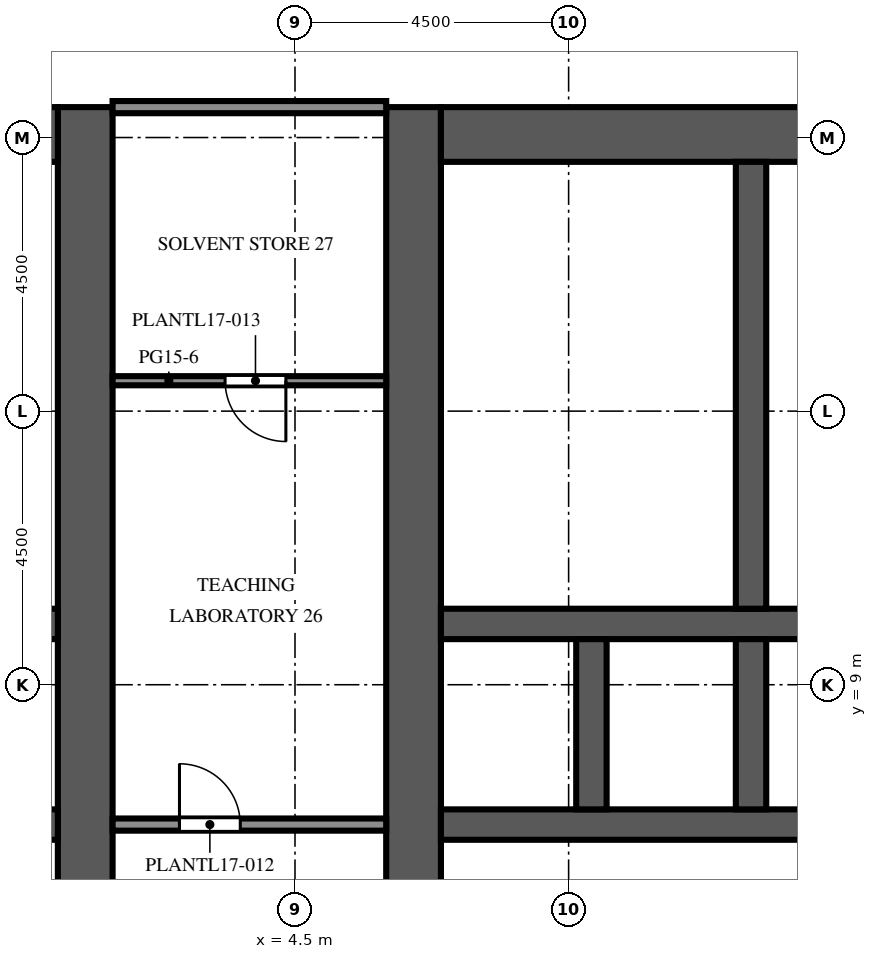
"""IFC4 building model, lengths in metres.
Left out: names, types, materials, properties, quantities, classifications, styles, units other than length and angle.
Written with IfcOpenShell. Run it as: python <this file> out.ifc"""

import sys

from ifc_helpers import new_model, si_unit, direction, frame, frame_2d, origin, place, context, subcontext, project, spatial, rectangle, extrude, element, fill, save


model = new_model("IFC4")
c1 = context("Model", 3, precision=1e-05, world=origin(), true_north=direction((0.0, 1.0)))
c2 = subcontext(c1, "Body", "Model", "MODEL_VIEW")
j1 = project(units=[si_unit("LENGTHUNIT", "METRE"), si_unit("PLANEANGLEUNIT", "RADIAN")], contexts=[c1])
p1 = place(None, origin())
s1 = spatial("IfcSite", under=j1, at=p1, CompositionType="ELEMENT")
p2 = place(p1, origin())
s2 = spatial("IfcBuilding", under=s1, at=p2, CompositionType="ELEMENT")
p3 = place(p2, frame((0.0, 0.0, 76.6)))
s3 = spatial("IfcBuildingStorey", under=s2, at=p3, CompositionType="ELEMENT", Elevation=76.6)
p4 = place(p3, frame((1.05, -9.0, 0.0), z_axis=(0.0, 0.0, 1.0), x_axis=(0.0, 1.0, 0.0)))
e1 = element("IfcWall", 1, at=p4, inside=s3, PredefinedType="SHEAR", context=c2, shape_type="SweptSolid", body=[
    extrude(rectangle(XDim=27.5, YDim=0.9, at=frame_2d((13.75, 0.0))), origin(), (0.0, 0.0, 1.0), 5.4),
])
p5 = place(p4, frame((12.55, 0.0, 0.0)))
e2 = element("IfcOpeningElement", 2, at=p5, cuts=e1, PredefinedType="OPENING", context=c2, shape_type="SweptSolid", body=[
    extrude(rectangle(XDim=2.4, YDim=2.4, at=frame_2d((1.2, 1.2))), frame((0.0, 0.46, 0.0), z_axis=(0.0, -1.0, 0.0), x_axis=(1.0, 0.0, 0.0)), (0.0, 0.0, 1.0), 0.92),
])
p6 = place(p4, frame((5.445, 0.0, 0.0)))
e3 = element("IfcOpeningElement", 3, at=p6, cuts=e1, PredefinedType="OPENING", context=c2, shape_type="SweptSolid", body=[
    extrude(rectangle(XDim=1.2, YDim=2.1, at=frame_2d((0.6, 1.05))), frame((0.0, 0.46, 0.0), z_axis=(0.0, -1.0, 0.0), x_axis=(1.0, 0.0, 0.0)), (0.0, 0.0, 1.0), 0.92),
])
p7 = place(p4, frame((19.485, 0.0, 0.0)))
e4 = element("IfcOpeningElement", 4, at=p7, cuts=e1, PredefinedType="OPENING", context=c2, shape_type="SweptSolid", body=[
    extrude(rectangle(XDim=1.0, YDim=2.1, at=frame_2d((0.5, 1.05))), frame((0.0, 0.46, 0.0), z_axis=(0.0, -1.0, 0.0), x_axis=(1.0, 0.0, 0.0)), (0.0, 0.0, 1.0), 0.92),
])
p8 = place(p4, frame((21.139, 0.0, 0.0)))
e5 = element("IfcOpeningElement", 5, at=p8, cuts=e1, PredefinedType="OPENING", context=c2, shape_type="SweptSolid", body=[
    extrude(rectangle(XDim=1.0, YDim=2.1, at=frame_2d((0.5, 1.05))), frame((0.0, 0.46, 0.0), z_axis=(0.0, -1.0, 0.0), x_axis=(1.0, 0.0, 0.0)), (0.0, 0.0, 1.0), 0.92),
])
p9 = place(p4, frame((23.16, 0.0, 0.0)))
e6 = element("IfcOpeningElement", 6, at=p9, cuts=e1, PredefinedType="OPENING", context=c2, shape_type="SweptSolid", body=[
    extrude(rectangle(XDim=1.0, YDim=2.1, at=frame_2d((0.5, 1.05))), frame((0.0, 0.46, 0.0), z_axis=(0.0, -1.0, 0.0), x_axis=(1.0, 0.0, 0.0)), (0.0, 0.0, 1.0), 0.92),
])
p10 = place(p4, frame((25.181, 0.0, 0.0)))
e7 = element("IfcOpeningElement", 7, at=p10, cuts=e1, PredefinedType="OPENING", context=c2, shape_type="SweptSolid", body=[
    extrude(rectangle(XDim=1.0, YDim=2.1, at=frame_2d((0.5, 1.05))), frame((0.0, 0.46, 0.0), z_axis=(0.0, -1.0, 0.0), x_axis=(1.0, 0.0, 0.0)), (0.0, 0.0, 1.0), 0.92),
])
p11 = place(p3, frame((-9.6, 18.05, 0.0), z_axis=(0.0, 0.0, 1.0), x_axis=(1.0, 0.0, 0.0)))
e8 = element("IfcWall", 8, at=p11, inside=s3, PredefinedType="SHEAR", context=c2, shape_type="SweptSolid", body=[
    extrude(rectangle(XDim=10.2, YDim=0.9, at=frame_2d((5.1, 0.0))), origin(), (0.0, 0.0, 1.0), 5.4),
])
p12 = place(p3, frame((-9.6, 6.7, 0.0), z_axis=(0.0, 0.0, 1.0), x_axis=(1.0, 0.0, 0.0)))
e9 = element("IfcWall", 9, at=p12, inside=s3, PredefinedType="SHEAR", context=c2, shape_type="SweptSolid", body=[
    extrude(rectangle(XDim=10.2, YDim=0.5, at=frame_2d((5.1, 0.0))), origin(), (0.0, 0.0, 1.0), 5.4),
])
p13 = place(p12, frame((0.562, 0.0, 0.0)))
e10 = element("IfcOpeningElement", 10, at=p13, cuts=e9, PredefinedType="OPENING", context=c2, shape_type="SweptSolid", body=[
    extrude(rectangle(XDim=1.1, YDim=2.1, at=frame_2d((0.55, 1.05))), frame((0.0, 0.26, 0.0), z_axis=(0.0, -1.0, 0.0), x_axis=(1.0, 0.0, 0.0)), (0.0, 0.0, 1.0), 0.52),
])
p14 = place(p12, frame((3.288, 0.0, 0.0)))
e11 = element("IfcOpeningElement", 11, at=p14, cuts=e9, PredefinedType="OPENING", context=c2, shape_type="SweptSolid", body=[
    extrude(rectangle(XDim=1.0, YDim=2.1, at=frame_2d((0.5, 1.05))), frame((0.0, 0.26, 0.0), z_axis=(0.0, -1.0, 0.0), x_axis=(1.0, 0.0, 0.0)), (0.0, 0.0, 1.0), 0.52),
])
p15 = place(p12, frame((5.913, 0.0, 0.0)))
e12 = element("IfcOpeningElement", 12, at=p15, cuts=e9, PredefinedType="OPENING", context=c2, shape_type="SweptSolid", body=[
    extrude(rectangle(XDim=1.0, YDim=2.1, at=frame_2d((0.5, 1.05))), frame((0.0, 0.26, 0.0), z_axis=(0.0, -1.0, 0.0), x_axis=(1.0, 0.0, 0.0)), (0.0, 0.0, 1.0), 0.52),
])
p16 = place(p12, frame((8.587, 0.0, 0.0)))
e13 = element("IfcOpeningElement", 13, at=p16, cuts=e9, PredefinedType="OPENING", context=c2, shape_type="SweptSolid", body=[
    extrude(rectangle(XDim=1.0, YDim=2.1, at=frame_2d((0.5, 1.05))), frame((0.0, 0.26, 0.0), z_axis=(0.0, -1.0, 0.0), x_axis=(1.0, 0.0, 0.0)), (0.0, 0.0, 1.0), 0.52),
])
p17 = place(p3, frame((-9.6, 10.0, 0.0), z_axis=(0.0, 0.0, 1.0), x_axis=(1.0, 0.0, 0.0)))
e14 = element("IfcWall", 14, at=p17, inside=s3, PredefinedType="SHEAR", context=c2, shape_type="SweptSolid", body=[
    extrude(rectangle(XDim=10.2, YDim=0.5, at=frame_2d((5.1, 0.0))), origin(), (0.0, 0.0, 1.0), 5.4),
])
p18 = place(p3, frame((6.45, -9.0, 0.0), z_axis=(0.0, 0.0, 1.0), x_axis=(0.0, 1.0, 0.0)))
e15 = element("IfcWall", 15, at=p18, inside=s3, PredefinedType="SHEAR", context=c2, shape_type="SweptSolid", body=[
    extrude(rectangle(XDim=27.5, YDim=0.9, at=frame_2d((13.75, 0.0))), origin(), (0.0, 0.0, 1.0), 5.4),
])
p19 = place(p18, frame((12.55, 0.0, 0.0)))
e16 = element("IfcOpeningElement", 16, at=p19, cuts=e15, PredefinedType="OPENING", context=c2, shape_type="SweptSolid", body=[
    extrude(rectangle(XDim=2.4, YDim=2.4, at=frame_2d((1.2, 1.2))), frame((0.0, 0.46, 0.0), z_axis=(0.0, -1.0, 0.0), x_axis=(1.0, 0.0, 0.0)), (0.0, 0.0, 1.0), 0.92),
])
p20 = place(p18, frame((5.445, 0.0, 0.0)))
e17 = element("IfcOpeningElement", 17, at=p20, cuts=e15, PredefinedType="OPENING", context=c2, shape_type="SweptSolid", body=[
    extrude(rectangle(XDim=1.2, YDim=2.1, at=frame_2d((0.6, 1.05))), frame((0.0, 0.46, 0.0), z_axis=(0.0, -1.0, 0.0), x_axis=(1.0, 0.0, 0.0)), (0.0, 0.0, 1.0), 0.92),
])
p21 = place(p18, frame((19.485, 0.0, 0.0)))
e18 = element("IfcOpeningElement", 18, at=p21, cuts=e15, PredefinedType="OPENING", context=c2, shape_type="SweptSolid", body=[
    extrude(rectangle(XDim=1.0, YDim=2.1, at=frame_2d((0.5, 1.05))), frame((0.0, 0.46, 0.0), z_axis=(0.0, -1.0, 0.0), x_axis=(1.0, 0.0, 0.0)), (0.0, 0.0, 1.0), 0.92),
])
p22 = place(p18, frame((21.139, 0.0, 0.0)))
e19 = element("IfcOpeningElement", 19, at=p22, cuts=e15, PredefinedType="OPENING", context=c2, shape_type="SweptSolid", body=[
    extrude(rectangle(XDim=1.0, YDim=2.1, at=frame_2d((0.5, 1.05))), frame((0.0, 0.46, 0.0), z_axis=(0.0, -1.0, 0.0), x_axis=(1.0, 0.0, 0.0)), (0.0, 0.0, 1.0), 0.92),
])
p23 = place(p18, frame((23.16, 0.0, 0.0)))
e20 = element("IfcOpeningElement", 20, at=p23, cuts=e15, PredefinedType="OPENING", context=c2, shape_type="SweptSolid", body=[
    extrude(rectangle(XDim=1.0, YDim=2.1, at=frame_2d((0.5, 1.05))), frame((0.0, 0.46, 0.0), z_axis=(0.0, -1.0, 0.0), x_axis=(1.0, 0.0, 0.0)), (0.0, 0.0, 1.0), 0.92),
])
p24 = place(p18, frame((25.181, 0.0, 0.0)))
e21 = element("IfcOpeningElement", 21, at=p24, cuts=e15, PredefinedType="OPENING", context=c2, shape_type="SweptSolid", body=[
    extrude(rectangle(XDim=1.0, YDim=2.1, at=frame_2d((0.5, 1.05))), frame((0.0, 0.46, 0.0), z_axis=(0.0, -1.0, 0.0), x_axis=(1.0, 0.0, 0.0)), (0.0, 0.0, 1.0), 0.92),
])
p25 = place(p3, frame((6.9, 18.05, 0.0), z_axis=(0.0, 0.0, 1.0), x_axis=(1.0, 0.0, 0.0)))
e22 = element("IfcWall", 22, at=p25, inside=s3, PredefinedType="SHEAR", context=c2, shape_type="SweptSolid", body=[
    extrude(rectangle(XDim=10.2, YDim=0.9, at=frame_2d((5.1, 0.0))), origin(), (0.0, 0.0, 1.0), 5.4),
])
p26 = place(p3, frame((6.9, 6.7, 0.0), z_axis=(0.0, 0.0, 1.0), x_axis=(1.0, 0.0, 0.0)))
e23 = element("IfcWall", 23, at=p26, inside=s3, PredefinedType="SHEAR", context=c2, shape_type="SweptSolid", body=[
    extrude(rectangle(XDim=10.2, YDim=0.5, at=frame_2d((5.1, 0.0))), origin(), (0.0, 0.0, 1.0), 5.4),
])
p27 = place(p26, frame((0.562, 0.0, 0.0)))
e24 = element("IfcOpeningElement", 24, at=p27, cuts=e23, PredefinedType="OPENING", context=c2, shape_type="SweptSolid", body=[
    extrude(rectangle(XDim=1.1, YDim=2.1, at=frame_2d((0.55, 1.05))), frame((0.0, 0.26, 0.0), z_axis=(0.0, -1.0, 0.0), x_axis=(1.0, 0.0, 0.0)), (0.0, 0.0, 1.0), 0.52),
])
p28 = place(p26, frame((3.288, 0.0, 0.0)))
e25 = element("IfcOpeningElement", 25, at=p28, cuts=e23, PredefinedType="OPENING", context=c2, shape_type="SweptSolid", body=[
    extrude(rectangle(XDim=1.0, YDim=2.1, at=frame_2d((0.5, 1.05))), frame((0.0, 0.26, 0.0), z_axis=(0.0, -1.0, 0.0), x_axis=(1.0, 0.0, 0.0)), (0.0, 0.0, 1.0), 0.52),
])
p29 = place(p26, frame((5.913, 0.0, 0.0)))
e26 = element("IfcOpeningElement", 26, at=p29, cuts=e23, PredefinedType="OPENING", context=c2, shape_type="SweptSolid", body=[
    extrude(rectangle(XDim=1.0, YDim=2.1, at=frame_2d((0.5, 1.05))), frame((0.0, 0.26, 0.0), z_axis=(0.0, -1.0, 0.0), x_axis=(1.0, 0.0, 0.0)), (0.0, 0.0, 1.0), 0.52),
])
p30 = place(p26, frame((8.587, 0.0, 0.0)))
e27 = element("IfcOpeningElement", 27, at=p30, cuts=e23, PredefinedType="OPENING", context=c2, shape_type="SweptSolid", body=[
    extrude(rectangle(XDim=1.0, YDim=2.1, at=frame_2d((0.5, 1.05))), frame((0.0, 0.26, 0.0), z_axis=(0.0, -1.0, 0.0), x_axis=(1.0, 0.0, 0.0)), (0.0, 0.0, 1.0), 0.52),
])
p31 = place(p3, frame((6.9, 10.0, 0.0), z_axis=(0.0, 0.0, 1.0), x_axis=(1.0, 0.0, 0.0)))
e28 = element("IfcWall", 28, at=p31, inside=s3, PredefinedType="SHEAR", context=c2, shape_type="SweptSolid", body=[
    extrude(rectangle(XDim=10.2, YDim=0.5, at=frame_2d((5.1, 0.0))), origin(), (0.0, 0.0, 1.0), 5.4),
])
for number, where, z_axis, x_axis in (
    (29, (9.375, 6.95, 0.0), (0.0, 0.0, 1.0), (0.0, 1.0, 0.0)),
    (30, (12.0, 6.95, 0.0), (0.0, 0.0, 1.0), (0.0, 1.0, 0.0)),
):
    element("IfcWall", number, at=place(p3, frame(where, z_axis=z_axis, x_axis=x_axis)), inside=s3, PredefinedType="SHEAR", context=c2, shape_type="SweptSolid", body=[
        extrude(rectangle(XDim=2.8, YDim=0.5, at=frame_2d((1.4, 0.0))), origin(), (0.0, 0.0, 1.0), 5.4),
    ])
p32 = place(p3, frame((12.0, 10.25, 0.0), z_axis=(0.0, 0.0, 1.0), x_axis=(0.0, 1.0, 0.0)))
e31 = element("IfcWall", 31, at=p32, inside=s3, PredefinedType="SHEAR", context=c2, shape_type="SweptSolid", body=[
    extrude(rectangle(XDim=7.35, YDim=0.5, at=frame_2d((3.675, 0.0))), origin(), (0.0, 0.0, 1.0), 5.4),
])
for number, where, z_axis, x_axis in (
    (32, (-4.25, 11.72, 0.0), (0.0, 0.0, 1.0), (1.0, 0.0, 0.0)),
    (33, (-4.25, 13.558, 0.0), (0.0, 0.0, 1.0), (1.0, 0.0, 0.0)),
    (34, (-4.25, 15.762, 0.0), (0.0, 0.0, 1.0), (1.0, 0.0, 0.0)),
    (35, (6.9, 11.72, 0.0), (0.0, 0.0, 1.0), (1.0, 0.0, 0.0)),
    (36, (6.9, 13.558, 0.0), (0.0, 0.0, 1.0), (1.0, 0.0, 0.0)),
    (37, (6.9, 15.762, 0.0), (0.0, 0.0, 1.0), (1.0, 0.0, 0.0)),
):
    element("IfcWall", number, at=place(p3, frame(where, z_axis=z_axis, x_axis=x_axis)), inside=s3, PredefinedType="PARTITIONING", context=c2, shape_type="SweptSolid", body=[
        extrude(rectangle(XDim=4.85, YDim=0.1, at=frame_2d((2.425, 0.0))), origin(), (0.0, 0.0, 1.0), 4.95),
    ])
p33 = place(p3, frame((1.5, 6.7, 0.0), z_axis=(0.0, 0.0, 1.0), x_axis=(1.0, 0.0, 0.0)))
e38 = element("IfcWall", 38, at=p33, inside=s3, PredefinedType="PARTITIONING", context=c2, shape_type="SweptSolid", body=[
    extrude(rectangle(XDim=4.5, YDim=0.2, at=frame_2d((2.25, 0.0))), origin(), (0.0, 0.0, 1.0), 4.95),
])
p34 = place(p33, frame((1.1, 0.0, 0.0)))
e39 = element("IfcOpeningElement", 39, at=p34, cuts=e38, PredefinedType="OPENING", context=c2, shape_type="SweptSolid", body=[
    extrude(rectangle(XDim=1.0, YDim=2.1, at=frame_2d((0.5, 1.05))), frame((0.0, 0.11, 0.0), z_axis=(0.0, -1.0, 0.0), x_axis=(1.0, 0.0, 0.0)), (0.0, 0.0, 1.0), 0.22),
])
p35 = place(p3, frame((1.5, 14.0, 0.0), z_axis=(0.0, 0.0, 1.0), x_axis=(1.0, 0.0, 0.0)))
e40 = element("IfcWall", 40, at=p35, inside=s3, PredefinedType="PARTITIONING", context=c2, shape_type="SweptSolid", body=[
    extrude(rectangle(XDim=4.5, YDim=0.15, at=frame_2d((2.25, 0.0))), origin(), (0.0, 0.0, 1.0), 4.95),
])
p36 = place(p35, frame((1.85, 0.0, 0.0)))
e41 = element("IfcOpeningElement", 41, at=p36, cuts=e40, PredefinedType="OPENING", context=c2, shape_type="SweptSolid", body=[
    extrude(rectangle(XDim=1.0, YDim=2.1, at=frame_2d((0.5, 1.05))), frame((0.0, 0.085, 0.0), z_axis=(0.0, -1.0, 0.0), x_axis=(1.0, 0.0, 0.0)), (0.0, 0.0, 1.0), 0.17),
])
p37 = place(p3, frame((1.5, 18.5, 0.0), z_axis=(0.0, 0.0, 1.0), x_axis=(1.0, 0.0, 0.0)))
e42 = element("IfcWall", 42, at=p37, inside=s3, PredefinedType="PARTITIONING", context=c2, shape_type="SweptSolid", body=[
    extrude(rectangle(XDim=4.5, YDim=0.2, at=frame_2d((2.25, 0.0))), origin(), (0.0, 0.0, 1.0), 4.95),
])
p38 = place(p27, origin())
e43 = element("IfcDoor", 43, at=p38, inside=s3, OperationType="DOUBLE_DOOR_SLIDING", PredefinedType="DOOR", context=c2, shape_type="SweptSolid", body=[
    extrude(rectangle(XDim=1.1, YDim=2.1, at=frame_2d((0.55, 1.05))), frame((0.0, 0.025, 0.0), z_axis=(0.0, -1.0, 0.0), x_axis=(1.0, 0.0, 0.0)), (0.0, 0.0, 1.0), 0.05),
])
fill(e24, e43)
p39 = place(p5, origin())
e44 = element("IfcDoor", 44, at=p39, inside=s3, OperationType="DOUBLE_DOOR_DOUBLE_SWING", PredefinedType="DOOR", context=c2, shape_type="SweptSolid", body=[
    extrude(rectangle(XDim=2.4, YDim=2.4, at=frame_2d((1.2, 1.2))), frame((0.0, 0.025, 0.0), z_axis=(0.0, -1.0, 0.0), x_axis=(1.0, 0.0, 0.0)), (0.0, 0.0, 1.0), 0.05),
])
fill(e2, e44)
p40 = place(p19, origin())
e45 = element("IfcDoor", 45, at=p40, inside=s3, OperationType="DOUBLE_DOOR_DOUBLE_SWING", PredefinedType="DOOR", context=c2, shape_type="SweptSolid", body=[
    extrude(rectangle(XDim=2.4, YDim=2.4, at=frame_2d((1.2, 1.2))), frame((0.0, 0.025, 0.0), z_axis=(0.0, -1.0, 0.0), x_axis=(1.0, 0.0, 0.0)), (0.0, 0.0, 1.0), 0.05),
])
fill(e16, e45)
p41 = place(p7, origin())
e46 = element("IfcDoor", 46, at=p41, inside=s3, OperationType="SINGLE_SWING_LEFT", PredefinedType="DOOR", context=c2, shape_type="SweptSolid", body=[
    extrude(rectangle(XDim=1.0, YDim=2.1, at=frame_2d((0.5, 1.05))), frame((0.0, 0.425, 0.0), z_axis=(0.0, -1.0, 0.0), x_axis=(1.0, 0.0, 0.0)), (0.0, 0.0, 1.0), 0.05),
])
fill(e4, e46)
p42 = place(p8, origin())
e47 = element("IfcDoor", 47, at=p42, inside=s3, OperationType="SINGLE_SWING_RIGHT", PredefinedType="DOOR", context=c2, shape_type="SweptSolid", body=[
    extrude(rectangle(XDim=1.0, YDim=2.1, at=frame_2d((0.5, 1.05))), frame((0.0, 0.425, 0.0), z_axis=(0.0, -1.0, 0.0), x_axis=(1.0, 0.0, 0.0)), (0.0, 0.0, 1.0), 0.05),
])
fill(e5, e47)
p43 = place(p9, origin())
e48 = element("IfcDoor", 48, at=p43, inside=s3, OperationType="SINGLE_SWING_LEFT", PredefinedType="DOOR", context=c2, shape_type="SweptSolid", body=[
    extrude(rectangle(XDim=1.0, YDim=2.1, at=frame_2d((0.5, 1.05))), frame((0.0, 0.425, 0.0), z_axis=(0.0, -1.0, 0.0), x_axis=(1.0, 0.0, 0.0)), (0.0, 0.0, 1.0), 0.05),
])
fill(e6, e48)
p44 = place(p10, origin())
e49 = element("IfcDoor", 49, at=p44, inside=s3, OperationType="SINGLE_SWING_RIGHT", PredefinedType="DOOR", context=c2, shape_type="SweptSolid", body=[
    extrude(rectangle(XDim=1.0, YDim=2.1, at=frame_2d((0.5, 1.05))), frame((0.0, 0.425, 0.0), z_axis=(0.0, -1.0, 0.0), x_axis=(1.0, 0.0, 0.0)), (0.0, 0.0, 1.0), 0.05),
])
fill(e7, e49)
p45 = place(p28, origin())
e50 = element("IfcDoor", 50, at=p45, inside=s3, OperationType="SINGLE_SWING_RIGHT", PredefinedType="DOOR", context=c2, shape_type="SweptSolid", body=[
    extrude(rectangle(XDim=1.0, YDim=2.1, at=frame_2d((0.5, 1.05))), frame((0.0, 0.025, 0.0), z_axis=(0.0, -1.0, 0.0), x_axis=(1.0, 0.0, 0.0)), (0.0, 0.0, 1.0), 0.05),
])
fill(e25, e50)
p46 = place(p21, origin())
e51 = element("IfcDoor", 51, at=p46, inside=s3, OperationType="SINGLE_SWING_RIGHT", PredefinedType="DOOR", context=c2, shape_type="SweptSolid", body=[
    extrude(rectangle(XDim=1.0, YDim=2.1, at=frame_2d((0.5, 1.05))), frame((0.0, -0.375, 0.0), z_axis=(0.0, -1.0, 0.0), x_axis=(1.0, 0.0, 0.0)), (0.0, 0.0, 1.0), 0.05),
])
fill(e18, e51)
p47 = place(p22, origin())
e52 = element("IfcDoor", 52, at=p47, inside=s3, OperationType="SINGLE_SWING_LEFT", PredefinedType="DOOR", context=c2, shape_type="SweptSolid", body=[
    extrude(rectangle(XDim=1.0, YDim=2.1, at=frame_2d((0.5, 1.05))), frame((0.0, -0.375, 0.0), z_axis=(0.0, -1.0, 0.0), x_axis=(1.0, 0.0, 0.0)), (0.0, 0.0, 1.0), 0.05),
])
fill(e19, e52)
p48 = place(p23, origin())
e53 = element("IfcDoor", 53, at=p48, inside=s3, OperationType="SINGLE_SWING_RIGHT", PredefinedType="DOOR", context=c2, shape_type="SweptSolid", body=[
    extrude(rectangle(XDim=1.0, YDim=2.1, at=frame_2d((0.5, 1.05))), frame((0.0, -0.375, 0.0), z_axis=(0.0, -1.0, 0.0), x_axis=(1.0, 0.0, 0.0)), (0.0, 0.0, 1.0), 0.05),
])
fill(e20, e53)
p49 = place(p24, origin())
e54 = element("IfcDoor", 54, at=p49, inside=s3, OperationType="SINGLE_SWING_LEFT", PredefinedType="DOOR", context=c2, shape_type="SweptSolid", body=[
    extrude(rectangle(XDim=1.0, YDim=2.1, at=frame_2d((0.5, 1.05))), frame((0.0, -0.375, 0.0), z_axis=(0.0, -1.0, 0.0), x_axis=(1.0, 0.0, 0.0)), (0.0, 0.0, 1.0), 0.05),
])
fill(e21, e54)
p50 = place(p34, origin())
e55 = element("IfcDoor", 55, at=p50, inside=s3, OperationType="SINGLE_SWING_LEFT", PredefinedType="DOOR", context=c2, shape_type="SweptSolid", body=[
    extrude(rectangle(XDim=1.0, YDim=2.1, at=frame_2d((0.5, 1.05))), frame((0.0, 0.025, 0.0), z_axis=(0.0, -1.0, 0.0), x_axis=(1.0, 0.0, 0.0)), (0.0, 0.0, 1.0), 0.05),
])
fill(e39, e55)
p51 = place(p36, origin())
e56 = element("IfcDoor", 56, at=p51, inside=s3, OperationType="SINGLE_SWING_RIGHT", PredefinedType="DOOR", context=c2, shape_type="SweptSolid", body=[
    extrude(rectangle(XDim=1.0, YDim=2.1, at=frame_2d((0.5, 1.05))), frame((0.0, 0.025, 0.0), z_axis=(0.0, -1.0, 0.0), x_axis=(1.0, 0.0, 0.0)), (0.0, 0.0, 1.0), 0.05),
])
fill(e41, e56)
save(model, sys.argv[1])
